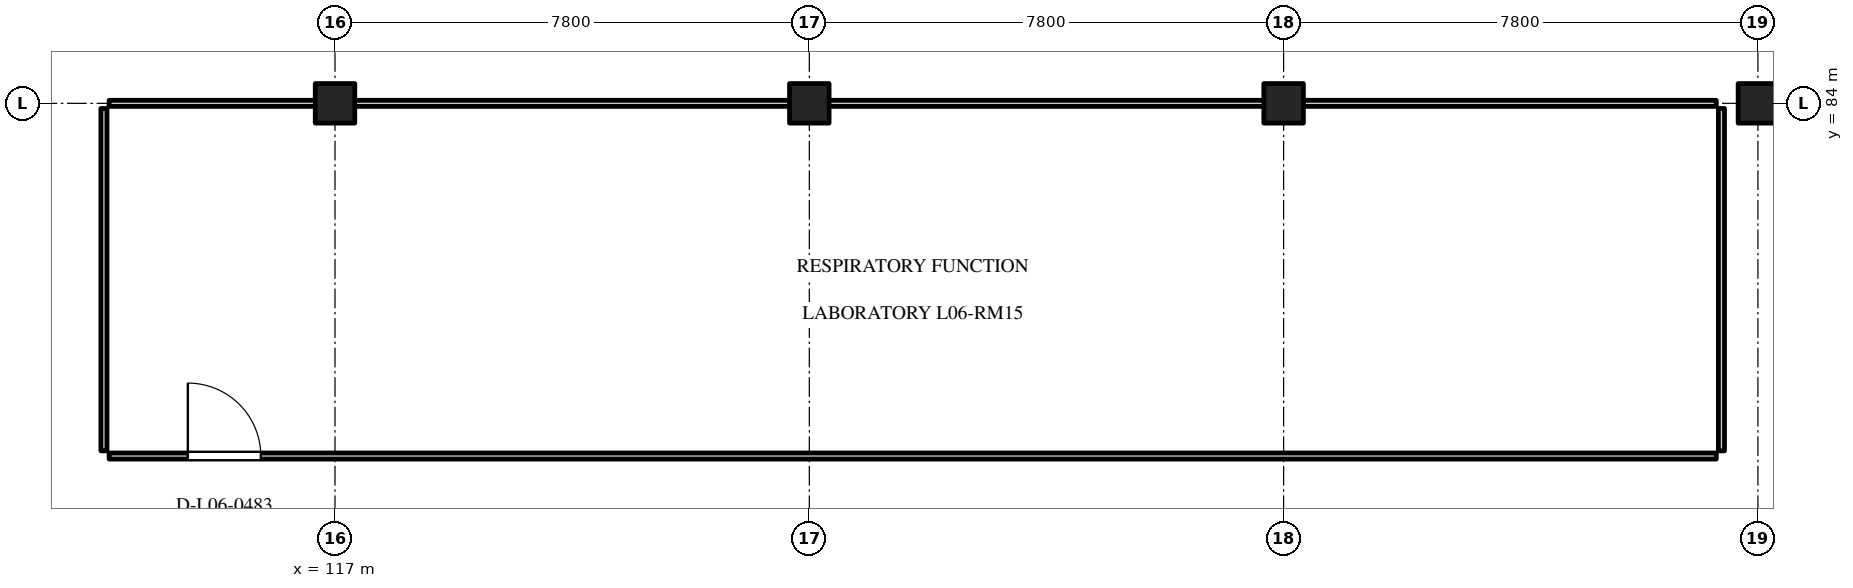
"""IFC4 building model, lengths in metres.
Left out: names, types, materials, properties, quantities, classifications, styles, units other than length and angle.
Written with IfcOpenShell. Run it as: python <this file> out.ifc"""

import sys

from ifc_helpers import new_model, si_unit, direction, frame, frame_2d, origin, origin_2d, place, context, subcontext, project, spatial, rectangle, extrude, element, fill, save


model = new_model("IFC4")
c1 = context("Model", 3, precision=1e-05, world=origin(), true_north=direction((0.0, 1.0)))
c2 = subcontext(c1, "Body", "Model", "MODEL_VIEW")
j1 = project(units=[si_unit("LENGTHUNIT", "METRE"), si_unit("PLANEANGLEUNIT", "RADIAN")], contexts=[c1])
p1 = place(None, origin())
s1 = spatial("IfcSite", under=j1, at=p1, CompositionType="ELEMENT")
p2 = place(p1, origin())
s2 = spatial("IfcBuilding", under=s1, at=p2, CompositionType="ELEMENT")
p3 = place(p2, frame((0.0, 0.0, 26.1)))
s3 = spatial("IfcBuildingStorey", under=s2, at=p3, CompositionType="ELEMENT", Elevation=26.1)
for number, where, z_axis, x_axis in (
    (1, (117.0, 84.0, 0.0), (0.0, 0.0, 1.0), (1.0, 0.0, 0.0)),
    (2, (124.8, 84.0, 0.0), (0.0, 0.0, 1.0), (1.0, 0.0, 0.0)),
    (3, (132.6, 84.0, 0.0), (0.0, 0.0, 1.0), (1.0, 0.0, 0.0)),
    (4, (140.4, 84.0, 0.0), (0.0, 0.0, 1.0), (1.0, 0.0, 0.0)),
):
    element("IfcColumn", number, at=place(p3, frame(where, z_axis=z_axis, x_axis=x_axis)), inside=s3, PredefinedType="COLUMN", context=c2, shape_type="SweptSolid", body=[
        extrude(rectangle(XDim=0.65, YDim=0.65, at=origin_2d()), origin(), (0.0, 0.0, 1.0), 3.6),
    ])
p4 = place(p3, frame((113.285, 78.2, 0.0), z_axis=(0.0, 0.0, 1.0), x_axis=(1.0, 0.0, 0.0)))
e5 = element("IfcWall", 5, at=p4, inside=s3, PredefinedType="PARTITIONING", context=c2, shape_type="SweptSolid", body=[
    extrude(rectangle(XDim=26.43, YDim=0.1, at=frame_2d((13.215, 0.0))), origin(), (0.0, 0.0, 1.0), 3.28),
])
p5 = place(p4, frame((1.295, 0.0, 0.0)))
e6 = element("IfcOpeningElement", 6, at=p5, cuts=e5, PredefinedType="OPENING", context=c2, shape_type="SweptSolid", body=[
    extrude(rectangle(XDim=1.2, YDim=2.15, at=frame_2d((0.6, 1.075))), frame((0.0, 0.062, 0.0), z_axis=(0.0, -1.0, 0.0), x_axis=(1.0, 0.0, 0.0)), (0.0, 0.0, 1.0), 0.124),
])
p6 = place(p3, frame((113.285, 84.0, 0.0), z_axis=(0.0, 0.0, 1.0), x_axis=(1.0, 0.0, 0.0)))
e7 = element("IfcWall", 7, at=p6, inside=s3, PredefinedType="PARTITIONING", context=c2, shape_type="SweptSolid", body=[
    extrude(rectangle(XDim=26.43, YDim=0.1, at=frame_2d((13.215, 0.0))), origin(), (0.0, 0.0, 1.0), 2.65),
])
for number, where, z_axis, x_axis in (
    (8, (113.2, 78.285, 0.0), (0.0, 0.0, 1.0), (0.0, 1.0, 0.0)),
    (9, (139.8, 78.285, 0.0), (0.0, 0.0, 1.0), (0.0, 1.0, 0.0)),
):
    element("IfcWall", number, at=place(p3, frame(where, z_axis=z_axis, x_axis=x_axis)), inside=s3, PredefinedType="PARTITIONING", context=c2, shape_type="SweptSolid", body=[
        extrude(rectangle(XDim=5.63, YDim=0.1, at=frame_2d((2.815, 0.0))), origin(), (0.0, 0.0, 1.0), 3.28),
    ])
p7 = place(p5, origin())
e10 = element("IfcDoor", 10, at=p7, inside=s3, OperationType="SINGLE_SWING_LEFT", PredefinedType="DOOR", context=c2, shape_type="SweptSolid", body=[
    extrude(rectangle(XDim=1.2, YDim=2.15, at=frame_2d((0.6, 1.075))), frame((0.0, 0.025, 0.0), z_axis=(0.0, -1.0, 0.0), x_axis=(1.0, 0.0, 0.0)), (0.0, 0.0, 1.0), 0.05),
])
fill(e6, e10)
save(model, sys.argv[1])
